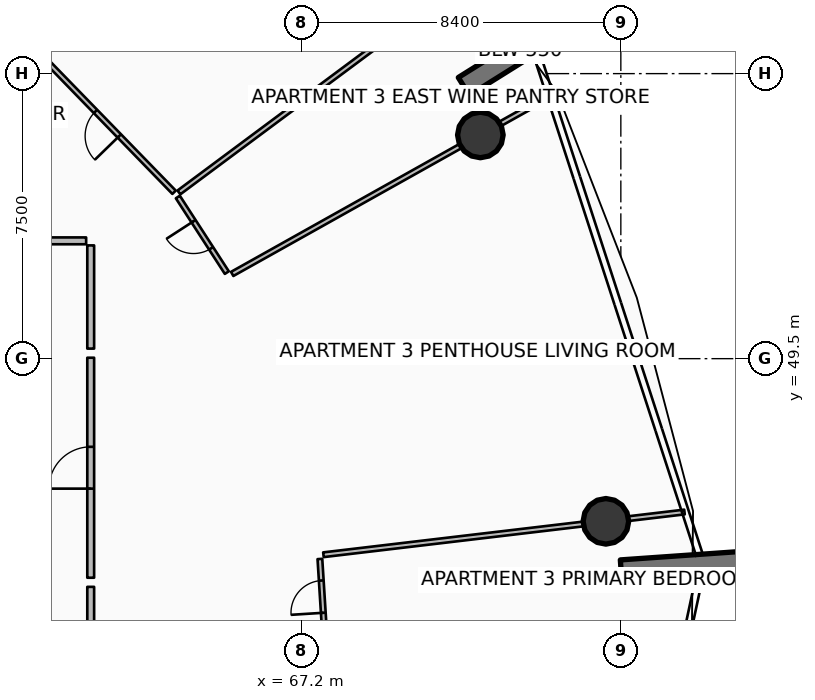
"""IFC4 building model, lengths in metres.
Left out: names, types, materials, properties, quantities, classifications, styles, units other than length and angle.
Written with IfcOpenShell. Run it as: python <this file> out.ifc"""

import sys

from ifc_helpers import new_model, si_unit, direction, frame, frame_2d, origin, origin_2d, place, context, subcontext, project, spatial, rectangle, circle, extrude, element, fill, save


model = new_model("IFC4")
c1 = context("Model", 3, precision=1e-05, world=origin(), true_north=direction((0.0, 1.0)))
c2 = subcontext(c1, "Body", "Model", "MODEL_VIEW")
j1 = project(units=[si_unit("LENGTHUNIT", "METRE"), si_unit("PLANEANGLEUNIT", "RADIAN")], contexts=[c1])
p1 = place(None, origin())
s1 = spatial("IfcSite", under=j1, at=p1, CompositionType="ELEMENT")
p2 = place(p1, origin())
s2 = spatial("IfcBuilding", under=s1, at=p2, CompositionType="ELEMENT")
p3 = place(p2, frame((0.0, 0.0, 93.9)))
s3 = spatial("IfcBuildingStorey", under=s2, at=p3, CompositionType="ELEMENT", Elevation=93.9)
for number, where, z_axis, x_axis in (
    (1, (71.469, 56.665, 0.0), (0.0, 0.0, 1.0), (0.848, 0.53, 0.0)),
    (2, (75.606, 43.93, 0.0), (0.0, 0.0, 1.0), (0.998, 0.07, 0.0)),
):
    element("IfcWall", number, at=place(p3, frame(where, z_axis=z_axis, x_axis=x_axis)), inside=s3, PredefinedType="SOLIDWALL", context=c2, shape_type="SweptSolid", body=[
        extrude(rectangle(XDim=3.5, YDim=0.55, at=frame_2d((1.75, 0.0))), origin(), (0.0, 0.0, 1.0), 3.75),
    ])
for number, where, z_axis, x_axis in (
    (3, (71.903, 55.386, 0.0), (0.0, 0.0, 1.0), (1.0, 0.0, 0.0)),
    (4, (75.207, 45.22, 0.0), (0.0, 0.0, 1.0), (1.0, 0.0, 0.0)),
):
    element("IfcColumn", number, at=place(p3, frame(where, z_axis=z_axis, x_axis=x_axis)), inside=s3, PredefinedType="COLUMN", context=c2, shape_type="SweptSolid", body=[
        extrude(circle(Radius=0.6, at=origin_2d()), origin(), (0.0, 0.0, 1.0), 3.5),
    ])
p4 = place(p3, frame((61.65, 43.736, 0.0), z_axis=(0.0, 0.0, 1.0), x_axis=(0.0, 1.0, 0.0)))
e5 = element("IfcWall", 5, at=p4, inside=s3, PredefinedType="PARTITIONING", context=c2, shape_type="SweptSolid", body=[
    extrude(rectangle(XDim=5.789, YDim=0.18, at=frame_2d((2.895, 0.0))), origin(), (0.0, 0.0, 1.0), 2.94),
])
p5 = place(p4, frame((2.344, 0.0, 0.0)))
e6 = element("IfcOpeningElement", 6, at=p5, cuts=e5, PredefinedType="OPENING", context=c2, shape_type="SweptSolid", body=[
    extrude(rectangle(XDim=1.1, YDim=2.1, at=frame_2d((0.55, 1.05))), frame((0.0, 0.1, 0.0), z_axis=(0.0, -1.0, 0.0), x_axis=(1.0, 0.0, 0.0)), (0.0, 0.0, 1.0), 0.2),
])
p6 = place(p3, frame((61.65, 38.27, 0.0), z_axis=(0.0, 0.0, 1.0), x_axis=(0.0, 1.0, 0.0)))
e7 = element("IfcWall", 7, at=p6, inside=s3, PredefinedType="PARTITIONING", context=c2, shape_type="SweptSolid", body=[
    extrude(rectangle(XDim=5.225, YDim=0.18, at=frame_2d((2.613, 0.0))), origin(), (0.0, 0.0, 1.0), 2.94),
])
p7 = place(p3, frame((67.774, 44.341, 0.0), z_axis=(0.0, 0.0, 1.0), x_axis=(0.993071471329, 0.117511926341, 0.0)))
e8 = element("IfcWall", 8, at=p7, inside=s3, PredefinedType="PARTITIONING", context=c2, shape_type="SweptSolid", body=[
    extrude(rectangle(XDim=9.567, YDim=0.125, at=frame_2d((4.784, 0.0))), origin(), (0.0, 0.0, 1.0), 2.94),
])
p8 = place(p3, frame((67.806, 42.246, 0.0), z_axis=(0.0, 0.0, 1.0), x_axis=(-0.06315855722, 0.998003505329, 0.0)))
e9 = element("IfcWall", 9, at=p8, inside=s3, PredefinedType="PARTITIONING", context=c2, shape_type="SweptSolid", body=[
    extrude(rectangle(XDim=1.987, YDim=0.125, at=frame_2d((0.993, 0.0))), origin(), (0.0, 0.0, 1.0), 2.94),
])
p9 = place(p8, frame((0.568, 0.0, 0.0)))
e10 = element("IfcOpeningElement", 10, at=p9, cuts=e9, PredefinedType="OPENING", context=c2, shape_type="SweptSolid", body=[
    extrude(rectangle(XDim=0.85, YDim=2.06, at=frame_2d((0.425, 1.03))), frame((0.0, 0.073, 0.0), z_axis=(0.0, -1.0, 0.0), x_axis=(1.0, 0.0, 0.0)), (0.0, 0.0, 1.0), 0.145),
])
p10 = place(p3, frame((61.65, 49.764, 0.0), z_axis=(0.0, 0.0, 1.0), x_axis=(0.0, 1.0, 0.0)))
e11 = element("IfcWall", 11, at=p10, inside=s3, PredefinedType="PARTITIONING", context=c2, shape_type="SweptSolid", body=[
    extrude(rectangle(XDim=2.716, YDim=0.18, at=frame_2d((1.358, 0.0))), origin(), (0.0, 0.0, 1.0), 2.94),
])
p11 = place(p3, frame((61.53, 52.6, 0.0), z_axis=(0.0, 0.0, 1.0), x_axis=(-1.0, 0.0, 0.0)))
e12 = element("IfcWall", 12, at=p11, inside=s3, PredefinedType="PARTITIONING", context=c2, shape_type="SweptSolid", body=[
    extrude(rectangle(XDim=5.054, YDim=0.18, at=frame_2d((2.527, 0.0))), origin(), (0.0, 0.0, 1.0), 2.94),
])
p12 = place(p3, frame((65.373, 51.729, 0.0), z_axis=(0.0, 0.0, 1.0), x_axis=(0.872500794254, 0.488612693272, 0.0)))
e13 = element("IfcWall", 13, at=p12, inside=s3, PredefinedType="PARTITIONING", context=c2, shape_type="SweptSolid", body=[
    extrude(rectangle(XDim=9.568, YDim=0.125, at=frame_2d((4.784, 0.0))), origin(), (0.0, 0.0, 1.0), 2.94),
])
p13 = place(p3, frame((63.971, 53.875, 0.0), z_axis=(0.0, 0.0, 1.0), x_axis=(0.802511356626, 0.596636843052, 0.0)))
e14 = element("IfcWall", 14, at=p13, inside=s3, PredefinedType="PARTITIONING", context=c2, shape_type="SweptSolid", body=[
    extrude(rectangle(XDim=9.295, YDim=0.125, at=frame_2d((4.647, 0.0))), origin(), (0.0, 0.0, 1.0), 2.94),
])
p14 = place(p3, frame((65.231, 51.764, 0.0), z_axis=(0.0, 0.0, 1.0), x_axis=(-0.543742324159, 0.839252217702, 0.0)))
e15 = element("IfcWall", 15, at=p14, inside=s3, PredefinedType="PARTITIONING", context=c2, shape_type="SweptSolid", body=[
    extrude(rectangle(XDim=2.37, YDim=0.125, at=frame_2d((1.185, 0.0))), origin(), (0.0, 0.0, 1.0), 2.94),
])
p15 = place(p14, frame((0.76, 0.0, 0.0)))
e16 = element("IfcOpeningElement", 16, at=p15, cuts=e15, PredefinedType="OPENING", context=c2, shape_type="SweptSolid", body=[
    extrude(rectangle(XDim=0.85, YDim=2.06, at=frame_2d((0.425, 1.03))), frame((0.0, 0.073, 0.0), z_axis=(0.0, -1.0, 0.0), x_axis=(1.0, 0.0, 0.0)), (0.0, 0.0, 1.0), 0.145),
])
p16 = place(p3, frame((63.844, 53.878, 0.0), z_axis=(0.0, 0.0, 1.0), x_axis=(-0.697043758456, 0.717028589944, 0.0)))
e17 = element("IfcWall", 17, at=p16, inside=s3, PredefinedType="PARTITIONING", context=c2, shape_type="SweptSolid", body=[
    extrude(rectangle(XDim=5.033, YDim=0.125, at=frame_2d((2.517, 0.0))), origin(), (0.0, 0.0, 1.0), 2.94),
])
p17 = place(p16, frame((2.066, 0.0, 0.0)))
e18 = element("IfcOpeningElement", 18, at=p17, cuts=e17, PredefinedType="OPENING", context=c2, shape_type="SweptSolid", body=[
    extrude(rectangle(XDim=0.9, YDim=2.08, at=frame_2d((0.45, 1.04))), frame((0.0, 0.073, 0.0), z_axis=(0.0, -1.0, 0.0), x_axis=(1.0, 0.0, 0.0)), (0.0, 0.0, 1.0), 0.145),
])
p18 = place(p5, origin())
e19 = element("IfcDoor", 19, at=p18, inside=s3, OperationType="SINGLE_SWING_LEFT", PredefinedType="DOOR", context=c2, shape_type="SweptSolid", body=[
    extrude(rectangle(XDim=1.1, YDim=2.1, at=frame_2d((0.55, 1.05))), frame((0.0, 0.025, 0.0), z_axis=(0.0, -1.0, 0.0), x_axis=(1.0, 0.0, 0.0)), (0.0, 0.0, 1.0), 0.05),
])
fill(e6, e19)
p19 = place(p9, origin())
e20 = element("IfcDoor", 20, at=p19, inside=s3, OperationType="SINGLE_SWING_LEFT", PredefinedType="DOOR", context=c2, shape_type="SweptSolid", body=[
    extrude(rectangle(XDim=0.85, YDim=2.06, at=frame_2d((0.425, 1.03))), frame((0.0, 0.025, 0.0), z_axis=(0.0, -1.0, 0.0), x_axis=(1.0, 0.0, 0.0)), (0.0, 0.0, 1.0), 0.05),
])
fill(e10, e20)
p20 = place(p15, origin())
e21 = element("IfcDoor", 21, at=p20, inside=s3, OperationType="SINGLE_SWING_RIGHT", PredefinedType="DOOR", context=c2, shape_type="SweptSolid", body=[
    extrude(rectangle(XDim=0.85, YDim=2.06, at=frame_2d((0.425, 1.03))), frame((0.0, 0.025, 0.0), z_axis=(0.0, -1.0, 0.0), x_axis=(1.0, 0.0, 0.0)), (0.0, 0.0, 1.0), 0.05),
])
fill(e16, e21)
p21 = place(p17, origin())
e22 = element("IfcDoor", 22, at=p21, inside=s3, OperationType="SINGLE_SWING_LEFT", PredefinedType="DOOR", context=c2, shape_type="SweptSolid", body=[
    extrude(rectangle(XDim=0.9, YDim=2.08, at=frame_2d((0.45, 1.04))), frame((0.0, 0.025, 0.0), z_axis=(0.0, -1.0, 0.0), x_axis=(1.0, 0.0, 0.0)), (0.0, 0.0, 1.0), 0.05),
])
fill(e18, e22)
save(model, sys.argv[1])
